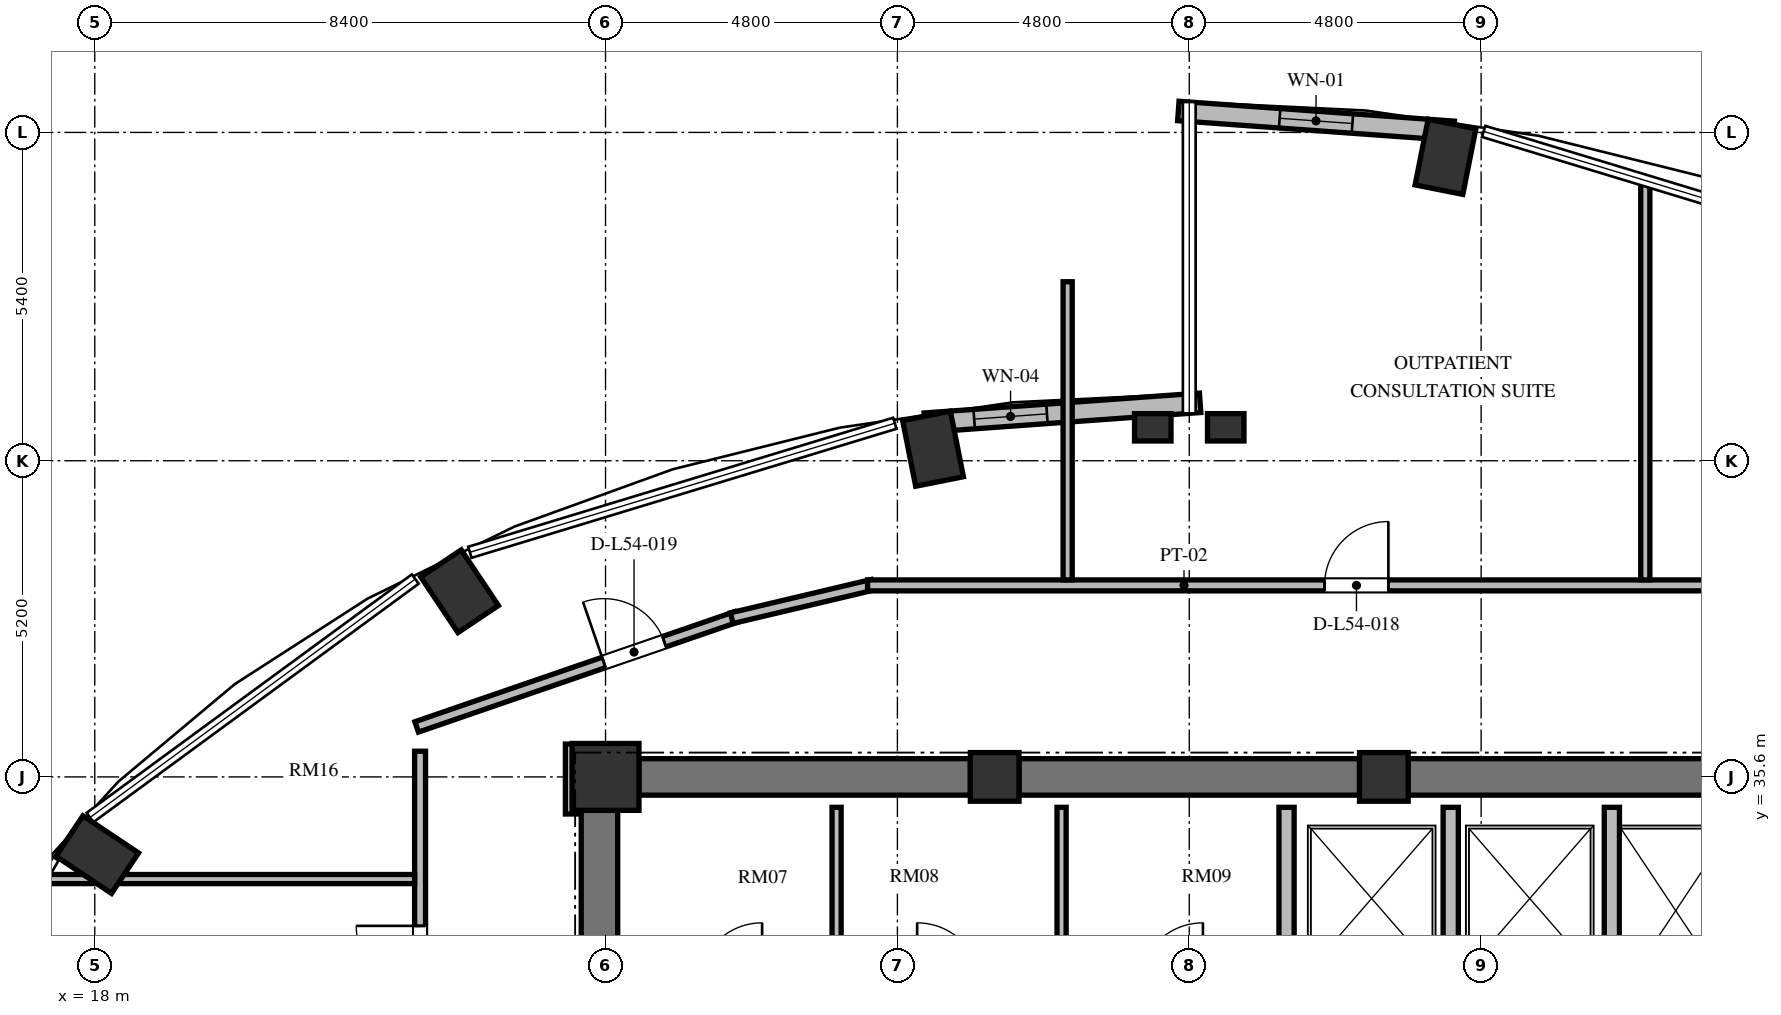
"""IFC4 building model, lengths in metres.
Left out: names, types, materials, properties, quantities, classifications, styles, units other than length and angle.
Written with IfcOpenShell. Run it as: python <this file> out.ifc"""

import sys

from ifc_helpers import new_model, si_unit, direction, frame, frame_2d, origin, origin_2d, place, context, subcontext, project, spatial, rectangle, extrude, element, fill, save


model = new_model("IFC4")
c1 = context("Model", 3, precision=1e-05, world=origin(), true_north=direction((0.0, 1.0)))
c2 = subcontext(c1, "Body", "Model", "MODEL_VIEW")
j1 = project(units=[si_unit("LENGTHUNIT", "METRE"), si_unit("PLANEANGLEUNIT", "RADIAN")], contexts=[c1])
p1 = place(None, origin())
s1 = spatial("IfcSite", under=j1, at=p1, CompositionType="ELEMENT")
p2 = place(p1, origin())
s2 = spatial("IfcBuilding", under=s1, at=p2, CompositionType="ELEMENT")
p3 = place(p2, frame((0.0, 0.0, 209.424)))
s3 = spatial("IfcBuildingStorey", under=s2, at=p3, CompositionType="ELEMENT", Elevation=209.424)
for number, where, z_axis, x_axis in (
    (1, (40.214, 45.798, 0.0), (0.0, 0.0, 1.0), (0.195, 0.981, 0.0)),
    (2, (31.786, 40.998, 0.0), (0.0, 0.0, 1.0), (-0.195, 0.981, 0.0)),
    (3, (24.0, 38.654, 0.0), (0.0, 0.0, 1.0), (-0.556, 0.831, 0.0)),
    (4, (18.04, 34.323, 0.0), (0.0, 0.0, 1.0), (-0.831, 0.556, 0.0)),
):
    element("IfcColumn", number, at=place(p3, frame(where, z_axis=z_axis, x_axis=x_axis)), inside=s3, PredefinedType="COLUMN", context=c2, shape_type="SweptSolid", body=[
        extrude(rectangle(XDim=1.1, YDim=0.8, at=origin_2d()), origin(), (0.0, 0.0, 1.0), 3.648),
    ])
for number, where, z_axis, x_axis in (
    (5, (39.2, 35.6, 0.0), (0.0, 0.0, 1.0), (1.0, 0.0, 0.0)),
    (6, (32.8, 35.6, 0.0), (0.0, 0.0, 1.0), (1.0, 0.0, 0.0)),
):
    element("IfcColumn", number, at=place(p3, frame(where, z_axis=z_axis, x_axis=x_axis)), inside=s3, PredefinedType="COLUMN", context=c2, shape_type="SweptSolid", body=[
        extrude(rectangle(XDim=0.8, YDim=0.8, at=origin_2d()), origin(), (0.0, 0.0, 1.0), 3.648),
    ])
p4 = place(p3, frame((26.4, 35.6, 0.0), z_axis=(0.0, 0.0, 1.0), x_axis=(1.0, 0.0, 0.0)))
e7 = element("IfcColumn", 7, at=p4, inside=s3, PredefinedType="COLUMN", context=c2, shape_type="SweptSolid", body=[
    extrude(rectangle(XDim=1.1, YDim=1.1, at=origin_2d()), origin(), (0.0, 0.0, 1.0), 3.648),
])
for number, where, z_axis, x_axis in (
    (8, (35.4, 41.35, 0.0), (0.0, 0.0, 1.0), (1.0, 0.0, 0.0)),
    (9, (36.6, 41.35, 0.0), (0.0, 0.0, 1.0), (1.0, 0.0, 0.0)),
):
    element("IfcColumn", number, at=place(p3, frame(where, z_axis=z_axis, x_axis=x_axis)), inside=s3, PredefinedType="PILASTER", context=c2, shape_type="SweptSolid", body=[
        extrude(rectangle(XDim=0.6, YDim=0.45, at=origin_2d()), origin(), (0.0, 0.0, 1.0), 3.648),
    ])
p5 = place(p3, frame((26.3, 20.95, 0.0), z_axis=(0.0, 0.0, 1.0), x_axis=(0.0, 1.0, 0.0)))
e10 = element("IfcWall", 10, at=p5, inside=s3, PredefinedType="SHEAR", context=c2, shape_type="SweptSolid", body=[
    extrude(rectangle(XDim=14.1, YDim=0.6, at=frame_2d((7.05, 0.0))), origin(), (0.0, 0.0, 1.0), 3.648),
])
p6 = place(p5, frame((6.5, 0.0, 0.0)))
e11 = element("IfcOpeningElement", 11, at=p6, cuts=e10, PredefinedType="OPENING", context=c2, shape_type="SweptSolid", body=[
    extrude(rectangle(XDim=1.2, YDim=2.15, at=frame_2d((0.6, 1.075))), frame((0.0, 0.31, 0.0), z_axis=(0.0, -1.0, 0.0), x_axis=(1.0, 0.0, 0.0)), (0.0, 0.0, 1.0), 0.62),
])
p7 = place(p5, frame((9.6, 0.0, 0.0)))
e12 = element("IfcOpeningElement", 12, at=p7, cuts=e10, PredefinedType="OPENING", context=c2, shape_type="SweptSolid", body=[
    extrude(rectangle(XDim=1.3, YDim=2.2, at=frame_2d((0.65, 1.1))), frame((0.0, 0.31, 0.0), z_axis=(0.0, -1.0, 0.0), x_axis=(1.0, 0.0, 0.0)), (0.0, 0.0, 1.0), 0.62),
])
p8 = place(p5, frame((3.26, 0.0, 0.0)))
e13 = element("IfcOpeningElement", 13, at=p8, cuts=e10, PredefinedType="OPENING", context=c2, shape_type="SweptSolid", body=[
    extrude(rectangle(XDim=1.3, YDim=2.2, at=frame_2d((0.65, 1.1))), frame((0.0, 0.31, 0.0), z_axis=(0.0, -1.0, 0.0), x_axis=(1.0, 0.0, 0.0)), (0.0, 0.0, 1.0), 0.62),
])
p9 = place(p3, frame((26.95, 35.6, 0.0), z_axis=(0.0, 0.0, 1.0), x_axis=(1.0, 0.0, 0.0)))
e14 = element("IfcWall", 14, at=p9, inside=s3, PredefinedType="SHEAR", context=c2, shape_type="SweptSolid", body=[
    extrude(rectangle(XDim=5.45, YDim=0.6, at=frame_2d((2.725, 0.0))), origin(), (0.0, 0.0, 1.0), 3.648),
])
p10 = place(p3, frame((33.2, 35.6, 0.0), z_axis=(0.0, 0.0, 1.0), x_axis=(1.0, 0.0, 0.0)))
e15 = element("IfcWall", 15, at=p10, inside=s3, PredefinedType="SHEAR", context=c2, shape_type="SweptSolid", body=[
    extrude(rectangle(XDim=5.6, YDim=0.6, at=frame_2d((2.8, 0.0))), origin(), (0.0, 0.0, 1.0), 3.648),
])
p11 = place(p3, frame((39.6, 35.6, 0.0), z_axis=(0.0, 0.0, 1.0), x_axis=(1.0, 0.0, 0.0)))
e16 = element("IfcWall", 16, at=p11, inside=s3, PredefinedType="SHEAR", context=c2, shape_type="SweptSolid", body=[
    extrude(rectangle(XDim=5.45, YDim=0.6, at=frame_2d((2.725, 0.0))), origin(), (0.0, 0.0, 1.0), 3.648),
])
p12 = place(p3, frame((40.35, 46.226, 0.0), z_axis=(0.0, 0.0, 1.0), x_axis=(-0.997409061056, 0.071938619141, 0.0)))
e17 = element("IfcWall", 17, at=p12, inside=s3, PredefinedType="SOLIDWALL", context=c2, shape_type="SweptSolid", body=[
    extrude(rectangle(XDim=4.541, YDim=0.32, at=frame_2d((2.271, 0.0))), origin(), (0.0, 0.0, 1.0), 3.448),
])
p13 = place(p12, frame((1.67, 0.0, 0.85)))
e18 = element("IfcOpeningElement", 18, at=p13, cuts=e17, PredefinedType="OPENING", context=c2, shape_type="SweptSolid", body=[
    extrude(rectangle(XDim=1.2, YDim=2.2, at=frame_2d((0.6, 1.1))), frame((0.0, 0.17, 0.0), z_axis=(0.0, -1.0, 0.0), x_axis=(1.0, 0.0, 0.0)), (0.0, 0.0, 1.0), 0.34),
])
p14 = place(p3, frame((36.179, 41.753, 0.0), z_axis=(0.0, 0.0, 1.0), x_axis=(-0.997408782787, -0.071942477163, 0.0)))
e19 = element("IfcWall", 19, at=p14, inside=s3, PredefinedType="SOLIDWALL", context=c2, shape_type="SweptSolid", body=[
    extrude(rectangle(XDim=4.541, YDim=0.32, at=frame_2d((2.27, 0.0))), origin(), (0.0, 0.0, 1.0), 3.448),
])
p15 = place(p14, frame((2.526, 0.0, 0.85)))
e20 = element("IfcOpeningElement", 20, at=p15, cuts=e19, PredefinedType="OPENING", context=c2, shape_type="SweptSolid", body=[
    extrude(rectangle(XDim=1.2, YDim=1.8, at=frame_2d((0.6, 0.9))), frame((0.0, 0.17, 0.0), z_axis=(0.0, -1.0, 0.0), x_axis=(1.0, 0.0, 0.0)), (0.0, 0.0, 1.0), 0.34),
])
p16 = place(p3, frame((42.95, 31.92, 0.0), z_axis=(0.0, 0.0, 1.0), x_axis=(0.0, 1.0, 0.0)))
e21 = element("IfcWall", 21, at=p16, inside=s3, PredefinedType="SOLIDWALL", context=c2, shape_type="SweptSolid", body=[
    extrude(rectangle(XDim=3.18, YDim=0.25, at=frame_2d((1.59, 0.0))), origin(), (0.0, 0.0, 1.0), 3.448),
])
for number, where, z_axis, x_axis in (
    (22, (37.6, 32.42, 0.0), (0.0, 0.0, 1.0), (0.0, 1.0, 0.0)),
    (23, (40.3, 32.42, 0.0), (0.0, 0.0, 1.0), (0.0, 1.0, 0.0)),
):
    element("IfcWall", number, at=place(p3, frame(where, z_axis=z_axis, x_axis=x_axis)), inside=s3, PredefinedType="SOLIDWALL", context=c2, shape_type="SweptSolid", body=[
        extrude(rectangle(XDim=2.68, YDim=0.25, at=frame_2d((1.34, 0.0))), origin(), (0.0, 0.0, 1.0), 3.448),
    ])
for number, where, z_axis, x_axis in (
    (24, (30.2, 32.42, 0.0), (0.0, 0.0, 1.0), (0.0, 1.0, 0.0)),
    (25, (33.9, 32.42, 0.0), (0.0, 0.0, 1.0), (0.0, 1.0, 0.0)),
):
    element("IfcWall", number, at=place(p3, frame(where, z_axis=z_axis, x_axis=x_axis)), inside=s3, PredefinedType="PARTITIONING", context=c2, shape_type="SweptSolid", body=[
        extrude(rectangle(XDim=2.68, YDim=0.15, at=frame_2d((1.34, 0.0))), origin(), (0.0, 0.0, 1.0), 3.448),
    ])
p17 = place(p3, frame((23.294, 36.422, 0.0), z_axis=(0.0, 0.0, 1.0), x_axis=(0.945493277461, 0.325641616316, 0.0)))
e26 = element("IfcWall", 26, at=p17, inside=s3, PredefinedType="PARTITIONING", context=c2, shape_type="SweptSolid", body=[
    extrude(rectangle(XDim=5.562, YDim=0.18, at=frame_2d((2.781, 0.0))), origin(), (0.0, 0.0, 1.0), 3.073),
])
p18 = place(p17, frame((3.256, 0.0, 0.0)))
e27 = element("IfcOpeningElement", 27, at=p18, cuts=e26, PredefinedType="OPENING", context=c2, shape_type="SweptSolid", body=[
    extrude(rectangle(XDim=1.05, YDim=2.15, at=frame_2d((0.525, 1.075))), frame((0.0, 0.1, 0.0), z_axis=(0.0, -1.0, 0.0), x_axis=(1.0, 0.0, 0.0)), (0.0, 0.0, 1.0), 0.2),
])
p19 = place(p3, frame((28.476, 38.211, 0.0), z_axis=(0.0, 0.0, 1.0), x_axis=(0.973030562203, 0.230676234189, 0.0)))
e28 = element("IfcWall", 28, at=p19, inside=s3, PredefinedType="PARTITIONING", context=c2, shape_type="SweptSolid", body=[
    extrude(rectangle(XDim=2.377, YDim=0.18, at=frame_2d((1.188, 0.0))), origin(), (0.0, 0.0, 1.0), 3.448),
])
p20 = place(p3, frame((30.71, 38.75, 0.0), z_axis=(0.0, 0.0, 1.0), x_axis=(1.0, 0.0, 0.0)))
e29 = element("IfcWall", 29, at=p20, inside=s3, PredefinedType="PARTITIONING", context=c2, shape_type="SweptSolid", body=[
    extrude(rectangle(XDim=20.815, YDim=0.18, at=frame_2d((10.408, 0.0))), origin(), (0.0, 0.0, 1.0), 3.073),
])
p21 = place(p20, frame((7.515, 0.0, 0.0)))
e30 = element("IfcOpeningElement", 30, at=p21, cuts=e29, PredefinedType="OPENING", context=c2, shape_type="SweptSolid", body=[
    extrude(rectangle(XDim=1.05, YDim=2.15, at=frame_2d((0.525, 1.075))), frame((0.0, 0.1, 0.0), z_axis=(0.0, -1.0, 0.0), x_axis=(1.0, 0.0, 0.0)), (0.0, 0.0, 1.0), 0.2),
])
p22 = place(p3, frame((25.83, 36.14, 0.0), z_axis=(0.0, 0.0, 1.0), x_axis=(0.0, -1.0, 0.0)))
e31 = element("IfcWall", 31, at=p22, inside=s3, PredefinedType="PARTITIONING", context=c2, shape_type="SweptSolid", body=[
    extrude(rectangle(XDim=1.15, YDim=0.18, at=frame_2d((0.575, 0.0))), origin(), (0.0, 0.0, 1.0), 3.448),
])
p23 = place(p3, frame((23.35, 19.98, 0.0), z_axis=(0.0, 0.0, 1.0), x_axis=(0.0, 1.0, 0.0)))
e32 = element("IfcWall", 32, at=p23, inside=s3, PredefinedType="PARTITIONING", context=c2, shape_type="SweptSolid", body=[
    extrude(rectangle(XDim=16.042, YDim=0.18, at=frame_2d((8.021, 0.0))), origin(), (0.0, 0.0, 1.0), 3.448),
])
p24 = place(p23, frame((6.975, 0.0, 0.0)))
e33 = element("IfcOpeningElement", 33, at=p24, cuts=e32, PredefinedType="OPENING", context=c2, shape_type="SweptSolid", body=[
    extrude(rectangle(XDim=1.05, YDim=2.15, at=frame_2d((0.525, 1.075))), frame((0.0, 0.1, 0.0), z_axis=(0.0, -1.0, 0.0), x_axis=(1.0, 0.0, 0.0)), (0.0, 0.0, 1.0), 0.2),
])
p25 = place(p23, frame((4.353, 0.0, 0.0)))
e34 = element("IfcOpeningElement", 34, at=p25, cuts=e32, PredefinedType="OPENING", context=c2, shape_type="SweptSolid", body=[
    extrude(rectangle(XDim=1.05, YDim=2.15, at=frame_2d((0.525, 1.075))), frame((0.0, 0.1, 0.0), z_axis=(0.0, -1.0, 0.0), x_axis=(1.0, 0.0, 0.0)), (0.0, 0.0, 1.0), 0.2),
])
p26 = place(p23, frame((12.12, 0.0, 0.0)))
e35 = element("IfcOpeningElement", 35, at=p26, cuts=e32, PredefinedType="OPENING", context=c2, shape_type="SweptSolid", body=[
    extrude(rectangle(XDim=1.05, YDim=2.15, at=frame_2d((0.525, 1.075))), frame((0.0, 0.1, 0.0), z_axis=(0.0, -1.0, 0.0), x_axis=(1.0, 0.0, 0.0)), (0.0, 0.0, 1.0), 0.2),
])
p27 = place(p23, frame((9.537, 0.0, 0.0)))
e36 = element("IfcOpeningElement", 36, at=p27, cuts=e32, PredefinedType="OPENING", context=c2, shape_type="SweptSolid", body=[
    extrude(rectangle(XDim=1.05, YDim=2.15, at=frame_2d((0.525, 1.075))), frame((0.0, 0.1, 0.0), z_axis=(0.0, -1.0, 0.0), x_axis=(1.0, 0.0, 0.0)), (0.0, 0.0, 1.0), 0.2),
])
p28 = place(p3, frame((17.132, 33.92, 0.0), z_axis=(0.0, 0.0, 1.0), x_axis=(1.0, 0.0, 0.0)))
e37 = element("IfcWall", 37, at=p28, inside=s3, PredefinedType="PARTITIONING", context=c2, shape_type="SweptSolid", body=[
    extrude(rectangle(XDim=6.128, YDim=0.15, at=frame_2d((3.064, 0.0))), origin(), (0.0, 0.0, 1.0), 3.448),
])
p29 = place(p3, frame((34.0, 38.84, 0.0), z_axis=(0.0, 0.0, 1.0), x_axis=(0.0, 1.0, 0.0)))
e38 = element("IfcWall", 38, at=p29, inside=s3, PredefinedType="PARTITIONING", context=c2, shape_type="SweptSolid", body=[
    extrude(rectangle(XDim=4.904, YDim=0.15, at=frame_2d((2.452, 0.0))), origin(), (0.0, 0.0, 1.0), 3.448),
])
p30 = place(p3, frame((43.5, 38.84, 0.0), z_axis=(0.0, 0.0, 1.0), x_axis=(0.0, 1.0, 0.0)))
e39 = element("IfcWall", 39, at=p30, inside=s3, PredefinedType="PARTITIONING", context=c2, shape_type="SweptSolid", body=[
    extrude(rectangle(XDim=6.552, YDim=0.15, at=frame_2d((3.276, 0.0))), origin(), (0.0, 0.0, 1.0), 3.448),
])
p31 = place(p13, origin())
e40 = element("IfcWindow", 40, at=p31, inside=s3, PartitioningType="SINGLE_PANEL", PredefinedType="WINDOW", context=c2, shape_type="SweptSolid", body=[
    extrude(rectangle(XDim=1.2, YDim=2.2, at=frame_2d((0.6, 1.1))), frame((0.0, 0.03, 0.0), z_axis=(0.0, -1.0, 0.0), x_axis=(1.0, 0.0, 0.0)), (0.0, 0.0, 1.0), 0.06),
])
fill(e18, e40)
p32 = place(p15, origin())
e41 = element("IfcWindow", 41, at=p32, inside=s3, PartitioningType="SINGLE_PANEL", PredefinedType="WINDOW", context=c2, shape_type="SweptSolid", body=[
    extrude(rectangle(XDim=1.2, YDim=1.8, at=frame_2d((0.6, 0.9))), frame((0.0, 0.03, 0.0), z_axis=(0.0, -1.0, 0.0), x_axis=(1.0, 0.0, 0.0)), (0.0, 0.0, 1.0), 0.06),
])
fill(e20, e41)
p33 = place(p21, origin())
e42 = element("IfcDoor", 42, at=p33, inside=s3, OperationType="SINGLE_SWING_RIGHT", PredefinedType="DOOR", context=c2, shape_type="SweptSolid", body=[
    extrude(rectangle(XDim=1.05, YDim=2.15, at=frame_2d((0.525, 1.075))), frame((0.0, 0.025, 0.0), z_axis=(0.0, -1.0, 0.0), x_axis=(1.0, 0.0, 0.0)), (0.0, 0.0, 1.0), 0.05),
])
fill(e30, e42)
p34 = place(p18, origin())
e43 = element("IfcDoor", 43, at=p34, inside=s3, OperationType="SINGLE_SWING_LEFT", PredefinedType="DOOR", context=c2, shape_type="SweptSolid", body=[
    extrude(rectangle(XDim=1.05, YDim=2.15, at=frame_2d((0.525, 1.075))), frame((0.0, 0.025, 0.0), z_axis=(0.0, -1.0, 0.0), x_axis=(1.0, 0.0, 0.0)), (0.0, 0.0, 1.0), 0.05),
])
fill(e27, e43)
p35 = place(p26, origin())
e44 = element("IfcDoor", 44, at=p35, inside=s3, OperationType="SINGLE_SWING_RIGHT", PredefinedType="DOOR", context=c2, shape_type="SweptSolid", body=[
    extrude(rectangle(XDim=1.05, YDim=2.15, at=frame_2d((0.525, 1.075))), frame((0.0, 0.025, 0.0), z_axis=(0.0, -1.0, 0.0), x_axis=(1.0, 0.0, 0.0)), (0.0, 0.0, 1.0), 0.05),
])
fill(e35, e44)
save(model, sys.argv[1])
